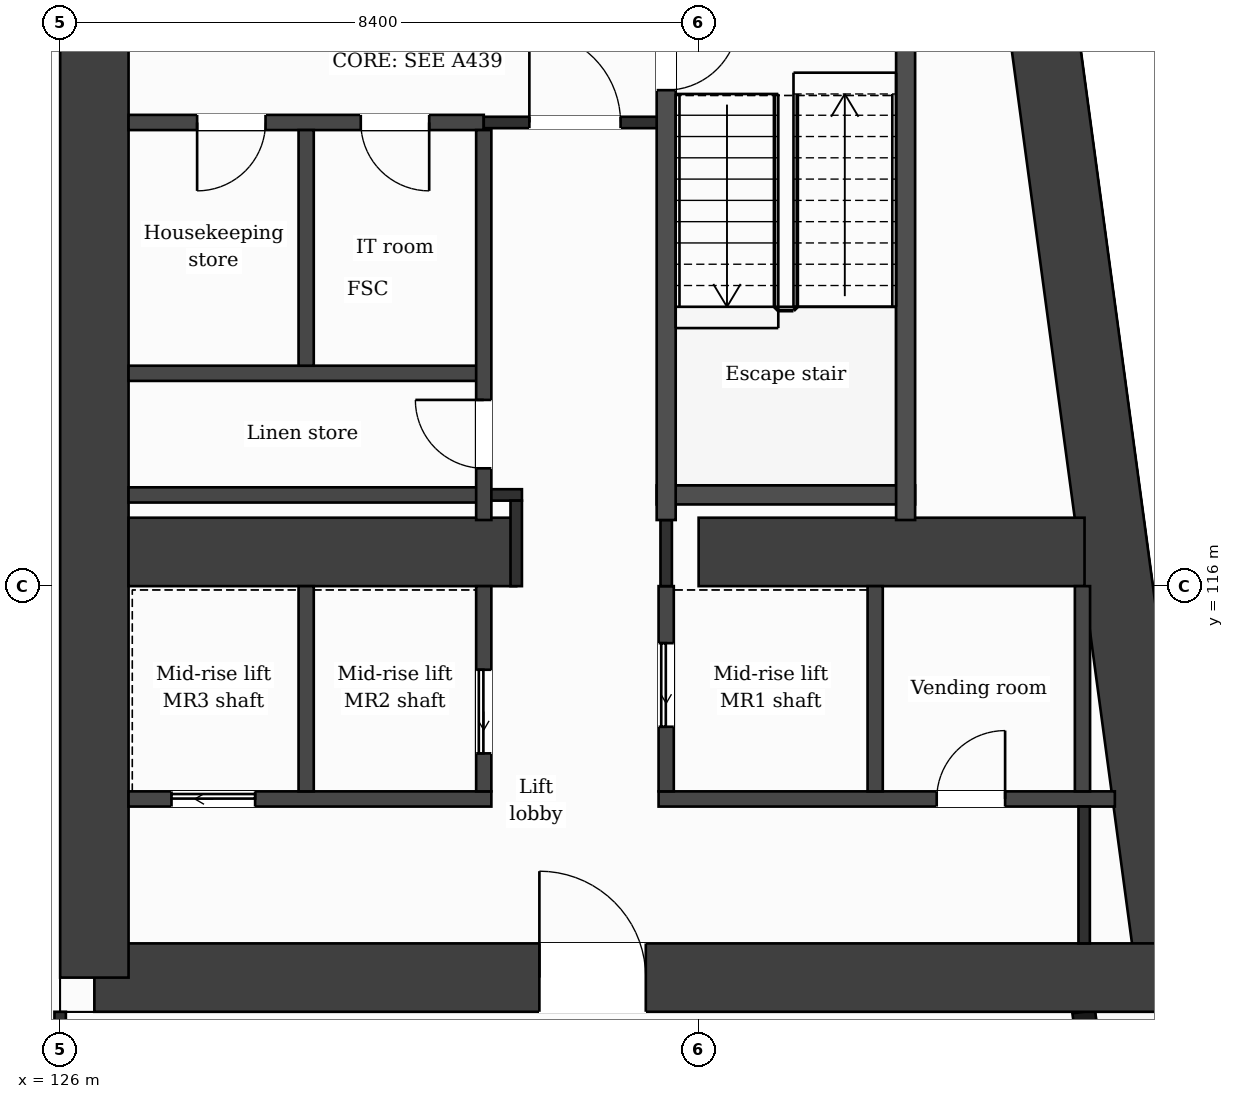
"""IFC4 building model, lengths in metres.
Left out: names, types, materials, properties, quantities, classifications, styles, units other than length and angle.
Written with IfcOpenShell. Run it as: python <this file> out.ifc"""

import sys

from ifc_helpers import new_model, si_unit, direction, frame, frame_2d, origin, place, context, subcontext, project, spatial, rectangle, extrude, element, fill, save


model = new_model("IFC4")
c1 = context("Model", 3, precision=1e-05, world=origin(), true_north=direction((0.0, 1.0)))
c2 = subcontext(c1, "Body", "Model", "MODEL_VIEW")
j1 = project(units=[si_unit("LENGTHUNIT", "METRE"), si_unit("PLANEANGLEUNIT", "RADIAN")], contexts=[c1])
p1 = place(None, origin())
s1 = spatial("IfcSite", under=j1, at=p1, CompositionType="ELEMENT")
p2 = place(p1, origin())
s2 = spatial("IfcBuilding", under=s1, at=p2, CompositionType="ELEMENT")
p3 = place(p2, frame((0.0, 0.0, 162.6)))
s3 = spatial("IfcBuildingStorey", under=s2, at=p3, CompositionType="ELEMENT", Elevation=162.6)
p4 = place(p3, frame((137.776, 131.95, 0.0), z_axis=(0.0, 0.0, 1.0), x_axis=(0.133421759112, -0.991059349482, 0.0)))
e1 = element("IfcWall", 1, at=p4, inside=s3, PredefinedType="SHEAR", context=c2, shape_type="SweptSolid", body=[
    extrude(rectangle(XDim=21.29, YDim=0.9, at=frame_2d((10.645, 0.0))), origin(), (0.0, 0.0, 1.0), 3.7),
])
p5 = place(p3, frame((140.616, 110.85, 0.0), z_axis=(0.0, 0.0, 1.0), x_axis=(-1.0, 0.0, 0.0)))
e2 = element("IfcWall", 2, at=p5, inside=s3, PredefinedType="SHEAR", context=c2, shape_type="SweptSolid", body=[
    extrude(rectangle(XDim=14.166, YDim=0.9, at=frame_2d((7.083, 0.0))), origin(), (0.0, 0.0, 1.0), 3.7),
])
p6 = place(p5, frame((6.911, 0.0, 0.0)))
e3 = element("IfcOpeningElement", 3, at=p6, cuts=e2, PredefinedType="OPENING", context=c2, shape_type="SweptSolid", body=[
    extrude(rectangle(XDim=1.4, YDim=2.1, at=frame_2d((0.7, 1.05))), frame((0.0, 0.46, 0.0), z_axis=(0.0, -1.0, 0.0), x_axis=(1.0, 0.0, 0.0)), (0.0, 0.0, 1.0), 0.92),
])
p7 = place(p3, frame((126.45, 110.85, 0.0), z_axis=(0.0, 0.0, 1.0), x_axis=(0.0, 1.0, 0.0)))
e4 = element("IfcWall", 4, at=p7, inside=s3, PredefinedType="SHEAR", context=c2, shape_type="SweptSolid", body=[
    extrude(rectangle(XDim=21.1, YDim=0.9, at=frame_2d((10.55, 0.0))), origin(), (0.0, 0.0, 1.0), 3.7),
])
p8 = place(p3, frame((126.9, 116.45, 0.0), z_axis=(0.0, 0.0, 1.0), x_axis=(1.0, 0.0, 0.0)))
e5 = element("IfcWall", 5, at=p8, inside=s3, PredefinedType="SHEAR", context=c2, shape_type="SweptSolid", body=[
    extrude(rectangle(XDim=5.1, YDim=0.9, at=frame_2d((2.55, 0.0))), origin(), (0.0, 0.0, 1.0), 3.7),
])
p9 = place(p3, frame((134.4, 116.45, 0.0), z_axis=(0.0, 0.0, 1.0), x_axis=(1.0, 0.0, 0.0)))
e6 = element("IfcWall", 6, at=p9, inside=s3, PredefinedType="SHEAR", context=c2, shape_type="SweptSolid", body=[
    extrude(rectangle(XDim=5.077, YDim=0.9, at=frame_2d((2.539, 0.0))), origin(), (0.0, 0.0, 1.0), 3.7),
])
p10 = place(p3, frame((140.348, 103.85, 0.0), z_axis=(0.0, 0.0, 1.0), x_axis=(-0.133431549479, 0.991058031401, 0.0)))
e7 = element("IfcWall", 7, at=p10, inside=s3, PredefinedType="SOLIDWALL", context=c2, shape_type="SweptSolid", body=[
    extrude(rectangle(XDim=6.609, YDim=0.3, at=frame_2d((3.304, 0.0))), origin(), (0.0, 0.0, 1.0), 3.38),
])
p11 = place(p10, frame((0.737, 0.0, 0.9)))
e8 = element("IfcOpeningElement", 8, at=p11, cuts=e7, PredefinedType="OPENING", context=c2, shape_type="SweptSolid", body=[
    extrude(rectangle(XDim=1.2, YDim=2.1, at=frame_2d((0.6, 1.05))), frame((0.0, 0.16, 0.0), z_axis=(0.0, -1.0, 0.0), x_axis=(1.0, 0.0, 0.0)), (0.0, 0.0, 1.0), 0.32),
])
p12 = place(p10, frame((3.991, 0.0, 0.0)))
e9 = element("IfcOpeningElement", 9, at=p12, cuts=e7, PredefinedType="OPENING", context=c2, shape_type="SweptSolid", body=[
    extrude(rectangle(XDim=1.2, YDim=2.4, at=frame_2d((0.6, 1.2))), frame((0.0, 0.16, 0.0), z_axis=(0.0, -1.0, 0.0), x_axis=(1.0, 0.0, 0.0)), (0.0, 0.0, 1.0), 0.32),
])
p13 = place(p3, frame((126.9, 113.2, 0.0), z_axis=(0.0, 0.0, 1.0), x_axis=(1.0, 0.0, 0.0)))
e10 = element("IfcWall", 10, at=p13, inside=s3, PredefinedType="PARTITIONING", context=c2, shape_type="SweptSolid", body=[
    extrude(rectangle(XDim=4.773, YDim=0.2, at=frame_2d((2.387, 0.0))), origin(), (0.0, 0.0, 1.0), 3.38),
])
p14 = place(p13, frame((0.565, 0.0, 0.0)))
e11 = element("IfcOpeningElement", 11, at=p14, cuts=e10, PredefinedType="OPENING", context=c2, shape_type="SweptSolid", body=[
    extrude(rectangle(XDim=1.1, YDim=2.1, at=frame_2d((0.55, 1.05))), frame((0.0, 0.11, 0.0), z_axis=(0.0, -1.0, 0.0), x_axis=(1.0, 0.0, 0.0)), (0.0, 0.0, 1.0), 0.22),
])
p15 = place(p3, frame((133.873, 113.2, 0.0), z_axis=(0.0, 0.0, 1.0), x_axis=(1.0, 0.0, 0.0)))
e12 = element("IfcWall", 12, at=p15, inside=s3, PredefinedType="PARTITIONING", context=c2, shape_type="SweptSolid", body=[
    extrude(rectangle(XDim=6.003, YDim=0.2, at=frame_2d((3.001, 0.0))), origin(), (0.0, 0.0, 1.0), 3.38),
])
p16 = place(p15, frame((3.659, 0.0, 0.0)))
e13 = element("IfcOpeningElement", 13, at=p16, cuts=e12, PredefinedType="OPENING", context=c2, shape_type="SweptSolid", body=[
    extrude(rectangle(XDim=0.9, YDim=2.1, at=frame_2d((0.45, 1.05))), frame((0.0, 0.11, 0.0), z_axis=(0.0, -1.0, 0.0), x_axis=(1.0, 0.0, 0.0)), (0.0, 0.0, 1.0), 0.22),
])
p17 = place(p3, frame((126.9, 117.2, 0.0), z_axis=(0.0, 0.0, 1.0), x_axis=(1.0, 0.0, 0.0)))
e14 = element("IfcWall", 14, at=p17, inside=s3, PredefinedType="PARTITIONING", context=c2, shape_type="SweptSolid", body=[
    extrude(rectangle(XDim=4.673, YDim=0.2, at=frame_2d((2.336, 0.0))), origin(), (0.0, 0.0, 1.0), 3.38),
])
p18 = place(p3, frame((131.573, 117.2, 0.0), z_axis=(0.0, 0.0, 1.0), x_axis=(1.0, 0.0, 0.0)))
e15 = element("IfcWall", 15, at=p18, inside=s3, PredefinedType="PARTITIONING", context=c2, shape_type="SweptSolid", body=[
    extrude(rectangle(XDim=0.502, YDim=0.15, at=frame_2d((0.251, 0.0))), origin(), (0.0, 0.0, 1.0), 3.38),
])
p19 = place(p3, frame((133.848, 117.2, 0.0), z_axis=(0.0, 0.0, 1.0), x_axis=(1.0, 0.0, 0.0)))
e16 = element("IfcWall", 16, at=p19, inside=s3, PredefinedType="PARTITIONING", context=c2, shape_type="SweptSolid", body=[
    extrude(rectangle(XDim=3.4, YDim=0.25, at=frame_2d((1.7, 0.0))), origin(), (0.0, 0.0, 1.0), 3.38),
])
p20 = place(p3, frame((126.9, 118.8, 0.0), z_axis=(0.0, 0.0, 1.0), x_axis=(1.0, 0.0, 0.0)))
e17 = element("IfcWall", 17, at=p20, inside=s3, PredefinedType="PARTITIONING", context=c2, shape_type="SweptSolid", body=[
    extrude(rectangle(XDim=4.673, YDim=0.2, at=frame_2d((2.336, 0.0))), origin(), (0.0, 0.0, 1.0), 3.38),
])
p21 = place(p3, frame((126.9, 122.1, 0.0), z_axis=(0.0, 0.0, 1.0), x_axis=(1.0, 0.0, 0.0)))
e18 = element("IfcWall", 18, at=p21, inside=s3, PredefinedType="PARTITIONING", context=c2, shape_type="SweptSolid", body=[
    extrude(rectangle(XDim=4.673, YDim=0.2, at=frame_2d((2.336, 0.0))), origin(), (0.0, 0.0, 1.0), 3.38),
])
p22 = place(p21, frame((3.055, 0.0, 0.0)))
e19 = element("IfcOpeningElement", 19, at=p22, cuts=e18, PredefinedType="OPENING", context=c2, shape_type="SweptSolid", body=[
    extrude(rectangle(XDim=0.9, YDim=2.1, at=frame_2d((0.45, 1.05))), frame((0.0, 0.11, 0.0), z_axis=(0.0, -1.0, 0.0), x_axis=(1.0, 0.0, 0.0)), (0.0, 0.0, 1.0), 0.22),
])
p23 = place(p21, frame((0.902, 0.0, 0.0)))
e20 = element("IfcOpeningElement", 20, at=p23, cuts=e18, PredefinedType="OPENING", context=c2, shape_type="SweptSolid", body=[
    extrude(rectangle(XDim=0.9, YDim=2.1, at=frame_2d((0.45, 1.05))), frame((0.0, 0.11, 0.0), z_axis=(0.0, -1.0, 0.0), x_axis=(1.0, 0.0, 0.0)), (0.0, 0.0, 1.0), 0.22),
])
p24 = place(p3, frame((131.573, 122.1, 0.0), z_axis=(0.0, 0.0, 1.0), x_axis=(1.0, 0.0, 0.0)))
e21 = element("IfcWall", 21, at=p24, inside=s3, PredefinedType="PARTITIONING", context=c2, shape_type="SweptSolid", body=[
    extrude(rectangle(XDim=2.4, YDim=0.15, at=frame_2d((1.2, 0.0))), origin(), (0.0, 0.0, 1.0), 3.38),
])
p25 = place(p24, frame((0.6, 0.0, 0.0)))
e22 = element("IfcOpeningElement", 22, at=p25, cuts=e21, PredefinedType="OPENING", context=c2, shape_type="SweptSolid", body=[
    extrude(rectangle(XDim=1.2, YDim=2.1, at=frame_2d((0.6, 1.05))), frame((0.0, 0.085, 0.0), z_axis=(0.0, -1.0, 0.0), x_axis=(1.0, 0.0, 0.0)), (0.0, 0.0, 1.0), 0.17),
])
p26 = place(p3, frame((126.0, 109.075, 0.0), z_axis=(0.0, 0.0, 1.0), x_axis=(0.0, 1.0, 0.0)))
e23 = element("IfcWall", 23, at=p26, inside=s3, PredefinedType="PARTITIONING", context=c2, shape_type="SweptSolid", body=[
    extrude(rectangle(XDim=1.325, YDim=0.15, at=frame_2d((0.663, 0.0))), origin(), (0.0, 0.0, 1.0), 3.38),
])
p27 = place(p3, frame((129.237, 113.3, 0.0), z_axis=(0.0, 0.0, 1.0), x_axis=(0.0, 1.0, 0.0)))
e24 = element("IfcWall", 24, at=p27, inside=s3, PredefinedType="PARTITIONING", context=c2, shape_type="SweptSolid", body=[
    extrude(rectangle(XDim=2.7, YDim=0.2, at=frame_2d((1.35, 0.0))), origin(), (0.0, 0.0, 1.0), 3.38),
])
p28 = place(p3, frame((129.237, 118.9, 0.0), z_axis=(0.0, 0.0, 1.0), x_axis=(0.0, 1.0, 0.0)))
e25 = element("IfcWall", 25, at=p28, inside=s3, PredefinedType="PARTITIONING", context=c2, shape_type="SweptSolid", body=[
    extrude(rectangle(XDim=3.1, YDim=0.2, at=frame_2d((1.55, 0.0))), origin(), (0.0, 0.0, 1.0), 3.38),
])
p29 = place(p3, frame((131.573, 113.3, 0.0), z_axis=(0.0, 0.0, 1.0), x_axis=(0.0, 1.0, 0.0)))
e26 = element("IfcWall", 26, at=p29, inside=s3, PredefinedType="PARTITIONING", context=c2, shape_type="SweptSolid", body=[
    extrude(rectangle(XDim=2.7, YDim=0.2, at=frame_2d((1.35, 0.0))), origin(), (0.0, 0.0, 1.0), 3.38),
])
p30 = place(p29, frame((0.5, 0.0, 0.0)))
e27 = element("IfcOpeningElement", 27, at=p30, cuts=e26, PredefinedType="OPENING", context=c2, shape_type="SweptSolid", body=[
    extrude(rectangle(XDim=1.1, YDim=2.1, at=frame_2d((0.55, 1.05))), frame((0.0, 0.11, 0.0), z_axis=(0.0, -1.0, 0.0), x_axis=(1.0, 0.0, 0.0)), (0.0, 0.0, 1.0), 0.22),
])
p31 = place(p3, frame((131.573, 116.87, 0.0), z_axis=(0.0, 0.0, 1.0), x_axis=(0.0, 1.0, 0.0)))
e28 = element("IfcWall", 28, at=p31, inside=s3, PredefinedType="PARTITIONING", context=c2, shape_type="SweptSolid", body=[
    extrude(rectangle(XDim=5.13, YDim=0.2, at=frame_2d((2.565, 0.0))), origin(), (0.0, 0.0, 1.0), 3.38),
])
p32 = place(p31, frame((0.68, 0.0, 0.0)))
e29 = element("IfcOpeningElement", 29, at=p32, cuts=e28, PredefinedType="OPENING", context=c2, shape_type="SweptSolid", body=[
    extrude(rectangle(XDim=0.9, YDim=2.1, at=frame_2d((0.45, 1.05))), frame((0.0, 0.11, 0.0), z_axis=(0.0, -1.0, 0.0), x_axis=(1.0, 0.0, 0.0)), (0.0, 0.0, 1.0), 0.22),
])
p33 = place(p3, frame((132.0, 116.0, 0.0), z_axis=(0.0, 0.0, 1.0), x_axis=(0.0, 1.0, 0.0)))
e30 = element("IfcWall", 30, at=p33, inside=s3, PredefinedType="PARTITIONING", context=c2, shape_type="SweptSolid", body=[
    extrude(rectangle(XDim=1.125, YDim=0.15, at=frame_2d((0.562, 0.0))), origin(), (0.0, 0.0, 1.0), 3.38),
])
p34 = place(p3, frame((133.973, 113.3, 0.0), z_axis=(0.0, 0.0, 1.0), x_axis=(0.0, 1.0, 0.0)))
e31 = element("IfcWall", 31, at=p34, inside=s3, PredefinedType="PARTITIONING", context=c2, shape_type="SweptSolid", body=[
    extrude(rectangle(XDim=2.7, YDim=0.2, at=frame_2d((1.35, 0.0))), origin(), (0.0, 0.0, 1.0), 3.38),
])
p35 = place(p34, frame((0.85, 0.0, 0.0)))
e32 = element("IfcOpeningElement", 32, at=p35, cuts=e31, PredefinedType="OPENING", context=c2, shape_type="SweptSolid", body=[
    extrude(rectangle(XDim=1.1, YDim=2.1, at=frame_2d((0.55, 1.05))), frame((0.0, 0.11, 0.0), z_axis=(0.0, -1.0, 0.0), x_axis=(1.0, 0.0, 0.0)), (0.0, 0.0, 1.0), 0.22),
])
p36 = place(p3, frame((133.973, 116.0, 0.0), z_axis=(0.0, 0.0, 1.0), x_axis=(0.0, 1.0, 0.0)))
e33 = element("IfcWall", 33, at=p36, inside=s3, PredefinedType="PARTITIONING", context=c2, shape_type="SweptSolid", body=[
    extrude(rectangle(XDim=0.87, YDim=0.15, at=frame_2d((0.435, 0.0))), origin(), (0.0, 0.0, 1.0), 3.38),
])
p37 = place(p3, frame((133.973, 116.87, 0.0), z_axis=(0.0, 0.0, 1.0), x_axis=(0.0, 1.0, 0.0)))
e34 = element("IfcWall", 34, at=p37, inside=s3, PredefinedType="PARTITIONING", context=c2, shape_type="SweptSolid", body=[
    extrude(rectangle(XDim=6.955, YDim=0.25, at=frame_2d((3.478, 0.0))), origin(), (0.0, 0.0, 1.0), 3.38),
])
p38 = place(p37, frame((5.655, 0.0, 0.0)))
e35 = element("IfcOpeningElement", 35, at=p38, cuts=e34, PredefinedType="OPENING", context=c2, shape_type="SweptSolid", body=[
    extrude(rectangle(XDim=0.95, YDim=2.1, at=frame_2d((0.475, 1.05))), frame((0.0, 0.135, 0.0), z_axis=(0.0, -1.0, 0.0), x_axis=(1.0, 0.0, 0.0)), (0.0, 0.0, 1.0), 0.27),
])
p39 = place(p3, frame((136.722, 113.3, 0.0), z_axis=(0.0, 0.0, 1.0), x_axis=(0.0, 1.0, 0.0)))
e36 = element("IfcWall", 36, at=p39, inside=s3, PredefinedType="PARTITIONING", context=c2, shape_type="SweptSolid", body=[
    extrude(rectangle(XDim=2.7, YDim=0.2, at=frame_2d((1.35, 0.0))), origin(), (0.0, 0.0, 1.0), 3.38),
])
p40 = place(p3, frame((137.123, 116.87, 0.0), z_axis=(0.0, 0.0, 1.0), x_axis=(0.0, 1.0, 0.0)))
e37 = element("IfcWall", 37, at=p40, inside=s3, PredefinedType="PARTITIONING", context=c2, shape_type="SweptSolid", body=[
    extrude(rectangle(XDim=6.955, YDim=0.25, at=frame_2d((3.478, 0.0))), origin(), (0.0, 0.0, 1.0), 3.38),
])
p41 = place(p3, frame((139.45, 113.3, 0.0), z_axis=(0.0, 0.0, 1.0), x_axis=(0.0, 1.0, 0.0)))
e38 = element("IfcWall", 38, at=p41, inside=s3, PredefinedType="PARTITIONING", context=c2, shape_type="SweptSolid", body=[
    extrude(rectangle(XDim=2.7, YDim=0.2, at=frame_2d((1.35, 0.0))), origin(), (0.0, 0.0, 1.0), 3.38),
])
p42 = place(p3, frame((139.472, 111.3, 0.0), z_axis=(0.0, 0.0, 1.0), x_axis=(0.0, 1.0, 0.0)))
e39 = element("IfcWall", 39, at=p42, inside=s3, PredefinedType="PARTITIONING", context=c2, shape_type="SweptSolid", body=[
    extrude(rectangle(XDim=1.8, YDim=0.15, at=frame_2d((0.9, 0.0))), origin(), (0.0, 0.0, 1.0), 3.38),
])
p43 = place(p25, origin())
e40 = element("IfcDoor", 40, at=p43, inside=s3, OperationType="SINGLE_SWING_LEFT", PredefinedType="DOOR", context=c2, shape_type="SweptSolid", body=[
    extrude(rectangle(XDim=1.2, YDim=2.1, at=frame_2d((0.6, 1.05))), frame((0.0, 0.025, 0.0), z_axis=(0.0, -1.0, 0.0), x_axis=(1.0, 0.0, 0.0)), (0.0, 0.0, 1.0), 0.05),
])
fill(e22, e40)
p44 = place(p22, origin())
e41 = element("IfcDoor", 41, at=p44, inside=s3, OperationType="SINGLE_SWING_RIGHT", PredefinedType="DOOR", context=c2, shape_type="SweptSolid", body=[
    extrude(rectangle(XDim=0.9, YDim=2.1, at=frame_2d((0.45, 1.05))), frame((0.0, 0.025, 0.0), z_axis=(0.0, -1.0, 0.0), x_axis=(1.0, 0.0, 0.0)), (0.0, 0.0, 1.0), 0.05),
])
fill(e19, e41)
p45 = place(p23, origin())
e42 = element("IfcDoor", 42, at=p45, inside=s3, OperationType="SINGLE_SWING_LEFT", PredefinedType="DOOR", context=c2, shape_type="SweptSolid", body=[
    extrude(rectangle(XDim=0.9, YDim=2.1, at=frame_2d((0.45, 1.05))), frame((0.0, 0.025, 0.0), z_axis=(0.0, -1.0, 0.0), x_axis=(1.0, 0.0, 0.0)), (0.0, 0.0, 1.0), 0.05),
])
fill(e20, e42)
p46 = place(p38, origin())
e43 = element("IfcDoor", 43, at=p46, inside=s3, OperationType="SINGLE_SWING_RIGHT", PredefinedType="DOOR", context=c2, shape_type="SweptSolid", body=[
    extrude(rectangle(XDim=0.95, YDim=2.1, at=frame_2d((0.475, 1.05))), frame((0.0, 0.025, 0.0), z_axis=(0.0, -1.0, 0.0), x_axis=(1.0, 0.0, 0.0)), (0.0, 0.0, 1.0), 0.05),
])
fill(e35, e43)
p47 = place(p32, origin())
e44 = element("IfcDoor", 44, at=p47, inside=s3, OperationType="SINGLE_SWING_RIGHT", PredefinedType="DOOR", context=c2, shape_type="SweptSolid", body=[
    extrude(rectangle(XDim=0.9, YDim=2.1, at=frame_2d((0.45, 1.05))), frame((0.0, 0.025, 0.0), z_axis=(0.0, -1.0, 0.0), x_axis=(1.0, 0.0, 0.0)), (0.0, 0.0, 1.0), 0.05),
])
fill(e29, e44)
p48 = place(p35, origin())
e45 = element("IfcDoor", 45, at=p48, inside=s3, OperationType="SLIDING_TO_LEFT", PredefinedType="DOOR", context=c2, shape_type="SweptSolid", body=[
    extrude(rectangle(XDim=1.1, YDim=2.1, at=frame_2d((0.55, 1.05))), frame((0.0, 0.025, 0.0), z_axis=(0.0, -1.0, 0.0), x_axis=(1.0, 0.0, 0.0)), (0.0, 0.0, 1.0), 0.05),
])
fill(e32, e45)
p49 = place(p30, origin())
e46 = element("IfcDoor", 46, at=p49, inside=s3, OperationType="SLIDING_TO_LEFT", PredefinedType="DOOR", context=c2, shape_type="SweptSolid", body=[
    extrude(rectangle(XDim=1.1, YDim=2.1, at=frame_2d((0.55, 1.05))), frame((0.0, 0.025, 0.0), z_axis=(0.0, -1.0, 0.0), x_axis=(1.0, 0.0, 0.0)), (0.0, 0.0, 1.0), 0.05),
])
fill(e27, e46)
p50 = place(p14, origin())
e47 = element("IfcDoor", 47, at=p50, inside=s3, OperationType="SLIDING_TO_LEFT", PredefinedType="DOOR", context=c2, shape_type="SweptSolid", body=[
    extrude(rectangle(XDim=1.1, YDim=2.1, at=frame_2d((0.55, 1.05))), frame((0.0, 0.025, 0.0), z_axis=(0.0, -1.0, 0.0), x_axis=(1.0, 0.0, 0.0)), (0.0, 0.0, 1.0), 0.05),
])
fill(e11, e47)
p51 = place(p16, origin())
e48 = element("IfcDoor", 48, at=p51, inside=s3, OperationType="SINGLE_SWING_RIGHT", PredefinedType="DOOR", context=c2, shape_type="SweptSolid", body=[
    extrude(rectangle(XDim=0.9, YDim=2.1, at=frame_2d((0.45, 1.05))), frame((0.0, 0.025, 0.0), z_axis=(0.0, -1.0, 0.0), x_axis=(1.0, 0.0, 0.0)), (0.0, 0.0, 1.0), 0.05),
])
fill(e13, e48)
p52 = place(p6, origin())
e49 = element("IfcDoor", 49, at=p52, inside=s3, OperationType="SINGLE_SWING_RIGHT", PredefinedType="DOOR", context=c2, shape_type="SweptSolid", body=[
    extrude(rectangle(XDim=1.4, YDim=2.1, at=frame_2d((0.7, 1.05))), frame((0.0, 0.025, 0.0), z_axis=(0.0, -1.0, 0.0), x_axis=(1.0, 0.0, 0.0)), (0.0, 0.0, 1.0), 0.05),
])
fill(e3, e49)
save(model, sys.argv[1])
